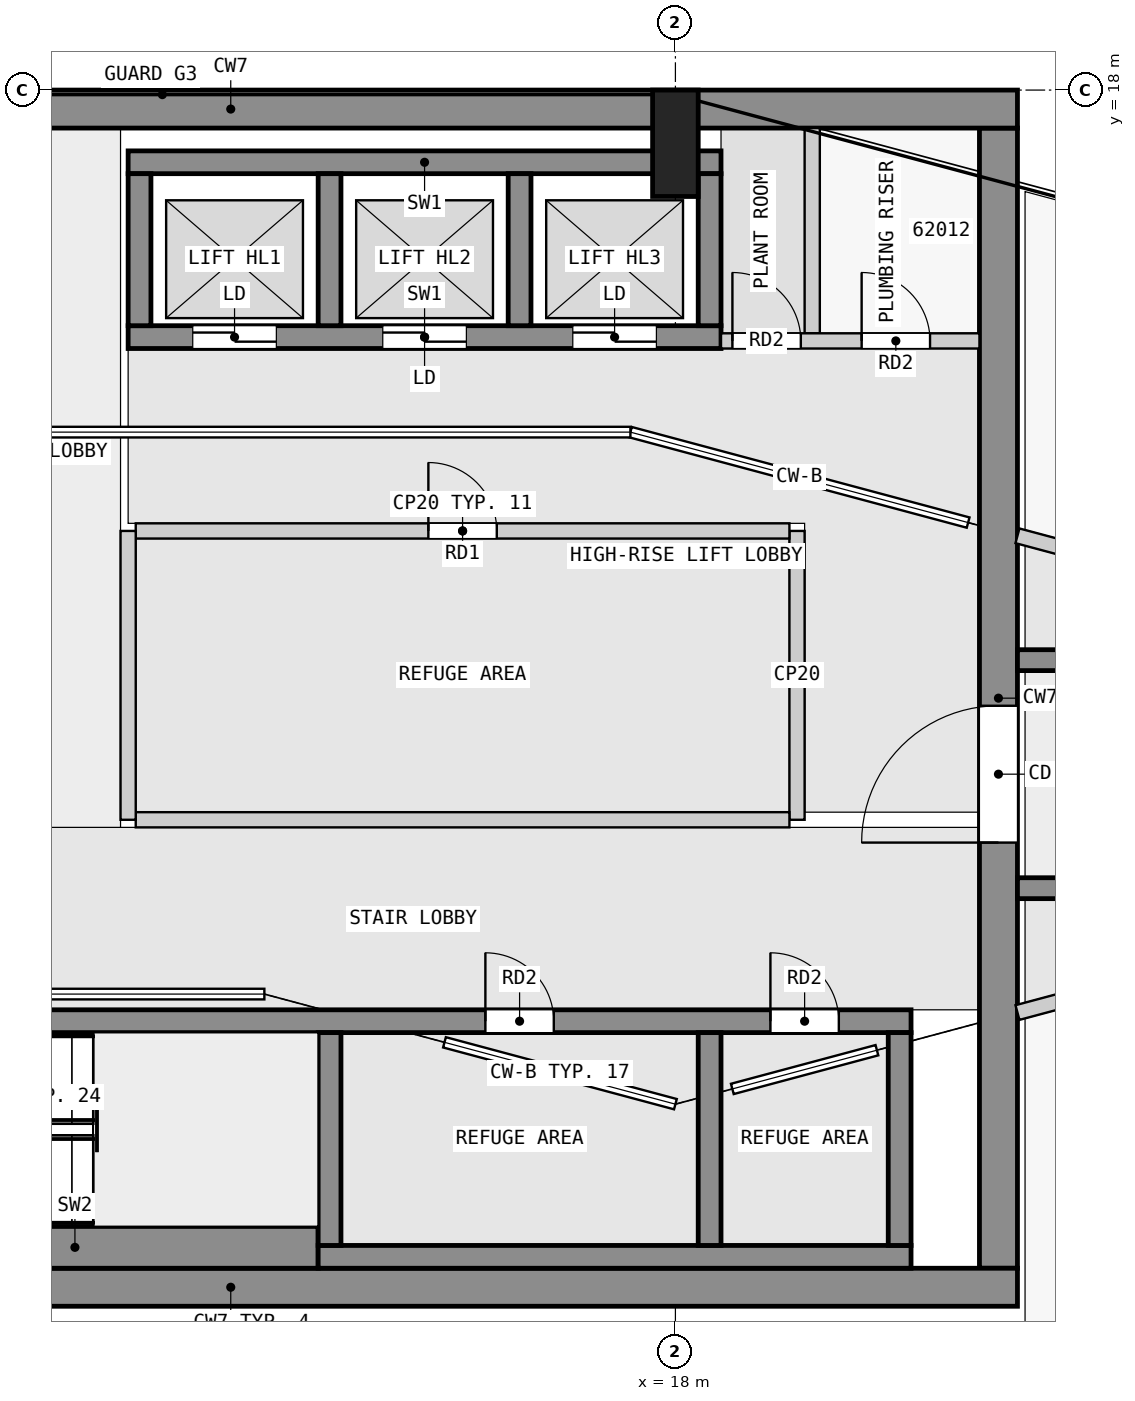
"""IFC4 building model, lengths in metres.
Left out: names, types, materials, properties, quantities, classifications, styles, units other than length and angle.
Written with IfcOpenShell. Run it as: python <this file> out.ifc"""

import sys

from ifc_helpers import new_model, si_unit, direction, frame, frame_2d, origin, origin_2d, place, context, subcontext, project, spatial, rectangle, extrude, element, fill, save


model = new_model("IFC4")
c1 = context("Model", 3, precision=1e-05, world=origin(), true_north=direction((0.0, 1.0)))
c2 = subcontext(c1, "Body", "Model", "MODEL_VIEW")
j1 = project(units=[si_unit("LENGTHUNIT", "METRE"), si_unit("PLANEANGLEUNIT", "RADIAN")], contexts=[c1])
p1 = place(None, origin())
s1 = spatial("IfcSite", under=j1, at=p1, CompositionType="ELEMENT")
p2 = place(p1, origin())
s2 = spatial("IfcBuilding", under=s1, at=p2, CompositionType="ELEMENT")
p3 = place(p2, frame((0.0, 0.0, 236.4)))
s3 = spatial("IfcBuildingStorey", under=s2, at=p3, CompositionType="ELEMENT", Elevation=236.4)
p4 = place(p3, frame((18.0, 17.3, 0.0), z_axis=(0.0, 0.0, 1.0), x_axis=(1.0, 0.0, 0.0)))
e1 = element("IfcColumn", 1, at=p4, inside=s3, PredefinedType="COLUMN", context=c2, shape_type="SweptSolid", body=[
    extrude(rectangle(XDim=0.6, YDim=1.4, at=origin_2d()), origin(), (0.0, 0.0, 1.0), 6.0),
])
for number, where, z_axis, x_axis in (
    (2, (1.8, 2.25, 0.0), (0.0, 0.0, 1.0), (1.0, 0.0, 0.0)),
    (3, (1.8, 17.75, 0.0), (0.0, 0.0, 1.0), (1.0, 0.0, 0.0)),
):
    element("IfcWall", number, at=place(p3, frame(where, z_axis=z_axis, x_axis=x_axis)), inside=s3, PredefinedType="SHEAR", context=c2, shape_type="SweptSolid", body=[
        extrude(rectangle(XDim=20.7, YDim=0.5, at=frame_2d((10.35, 0.0))), origin(), (0.0, 0.0, 1.0), 5.75),
    ])
p5 = place(p3, frame((22.25, 2.5, 0.0), z_axis=(0.0, 0.0, 1.0), x_axis=(0.0, 1.0, 0.0)))
e4 = element("IfcWall", 4, at=p5, inside=s3, PredefinedType="SHEAR", context=c2, shape_type="SweptSolid", body=[
    extrude(rectangle(XDim=15.0, YDim=0.5, at=frame_2d((7.5, 0.0))), origin(), (0.0, 0.0, 1.0), 5.75),
])
p6 = place(p5, frame((5.6, 0.0, 0.0)))
e5 = element("IfcOpeningElement", 5, at=p6, cuts=e4, PredefinedType="OPENING", context=c2, shape_type="SweptSolid", body=[
    extrude(rectangle(XDim=1.8, YDim=2.1, at=frame_2d((0.9, 1.05))), frame((0.0, 0.26, 0.0), z_axis=(0.0, -1.0, 0.0), x_axis=(1.0, 0.0, 0.0)), (0.0, 0.0, 1.0), 0.52),
])
p7 = place(p3, frame((6.9, 2.775, 0.0), z_axis=(0.0, 0.0, 1.0), x_axis=(1.0, 0.0, 0.0)))
e6 = element("IfcWall", 6, at=p7, inside=s3, PredefinedType="SHEAR", context=c2, shape_type="SweptSolid", body=[
    extrude(rectangle(XDim=6.4, YDim=0.55, at=frame_2d((3.2, 0.0))), origin(), (0.0, 0.0, 1.0), 5.75),
])
p8 = place(p3, frame((13.3, 2.65, 0.0), z_axis=(0.0, 0.0, 1.0), x_axis=(1.0, 0.0, 0.0)))
e7 = element("IfcWall", 7, at=p8, inside=s3, PredefinedType="SHEAR", context=c2, shape_type="SweptSolid", body=[
    extrude(rectangle(XDim=7.8, YDim=0.3, at=frame_2d((3.9, 0.0))), origin(), (0.0, 0.0, 1.0), 5.75),
])
for number, where, z_axis, x_axis in (
    (8, (13.45, 2.8, 0.0), (0.0, 0.0, 1.0), (0.0, 1.0, 0.0)),
    (9, (18.45, 2.8, 0.0), (0.0, 0.0, 1.0), (0.0, 1.0, 0.0)),
    (10, (20.95, 2.8, 0.0), (0.0, 0.0, 1.0), (0.0, 1.0, 0.0)),
):
    element("IfcWall", number, at=place(p3, frame(where, z_axis=z_axis, x_axis=x_axis)), inside=s3, PredefinedType="SHEAR", context=c2, shape_type="SweptSolid", body=[
        extrude(rectangle(XDim=2.8, YDim=0.3, at=frame_2d((1.4, 0.0))), origin(), (0.0, 0.0, 1.0), 5.75),
    ])
p9 = place(p3, frame((2.3, 5.75, 0.0), z_axis=(0.0, 0.0, 1.0), x_axis=(1.0, 0.0, 0.0)))
e11 = element("IfcWall", 11, at=p9, inside=s3, PredefinedType="SHEAR", context=c2, shape_type="SweptSolid", body=[
    extrude(rectangle(XDim=18.8, YDim=0.3, at=frame_2d((9.4, 0.0))), origin(), (0.0, 0.0, 1.0), 5.75),
])
p10 = place(p9, frame((4.65, 0.0, 0.0)))
e12 = element("IfcOpeningElement", 12, at=p10, cuts=e11, PredefinedType="OPENING", context=c2, shape_type="SweptSolid", body=[
    extrude(rectangle(XDim=1.1, YDim=2.1, at=frame_2d((0.55, 1.05))), frame((0.0, 0.16, 0.0), z_axis=(0.0, -1.0, 0.0), x_axis=(1.0, 0.0, 0.0)), (0.0, 0.0, 1.0), 0.32),
])
p11 = place(p9, frame((0.45, 0.0, 0.0)))
e13 = element("IfcOpeningElement", 13, at=p11, cuts=e11, PredefinedType="OPENING", context=c2, shape_type="SweptSolid", body=[
    extrude(rectangle(XDim=1.1, YDim=2.1, at=frame_2d((0.55, 1.05))), frame((0.0, 0.16, 0.0), z_axis=(0.0, -1.0, 0.0), x_axis=(1.0, 0.0, 0.0)), (0.0, 0.0, 1.0), 0.32),
])
p12 = place(p9, frame((2.75, 0.0, 0.0)))
e14 = element("IfcOpeningElement", 14, at=p12, cuts=e11, PredefinedType="OPENING", context=c2, shape_type="SweptSolid", body=[
    extrude(rectangle(XDim=1.1, YDim=2.1, at=frame_2d((0.55, 1.05))), frame((0.0, 0.16, 0.0), z_axis=(0.0, -1.0, 0.0), x_axis=(1.0, 0.0, 0.0)), (0.0, 0.0, 1.0), 0.32),
])
p13 = place(p9, frame((13.2, 0.0, 0.0)))
e15 = element("IfcOpeningElement", 15, at=p13, cuts=e11, PredefinedType="OPENING", context=c2, shape_type="SweptSolid", body=[
    extrude(rectangle(XDim=0.9, YDim=2.1, at=frame_2d((0.45, 1.05))), frame((0.0, 0.16, 0.0), z_axis=(0.0, -1.0, 0.0), x_axis=(1.0, 0.0, 0.0)), (0.0, 0.0, 1.0), 0.32),
])
p14 = place(p9, frame((16.95, 0.0, 0.0)))
e16 = element("IfcOpeningElement", 16, at=p14, cuts=e11, PredefinedType="OPENING", context=c2, shape_type="SweptSolid", body=[
    extrude(rectangle(XDim=0.9, YDim=2.1, at=frame_2d((0.45, 1.05))), frame((0.0, 0.16, 0.0), z_axis=(0.0, -1.0, 0.0), x_axis=(1.0, 0.0, 0.0)), (0.0, 0.0, 1.0), 0.32),
])
p15 = place(p3, frame((10.8, 17.05, 0.0), z_axis=(0.0, 0.0, 1.0), x_axis=(1.0, 0.0, 0.0)))
e17 = element("IfcWall", 17, at=p15, inside=s3, PredefinedType="SHEAR", context=c2, shape_type="SweptSolid", body=[
    extrude(rectangle(XDim=7.8, YDim=0.3, at=frame_2d((3.9, 0.0))), origin(), (0.0, 0.0, 1.0), 5.75),
])
p16 = place(p3, frame((10.8, 14.75, 0.0), z_axis=(0.0, 0.0, 1.0), x_axis=(1.0, 0.0, 0.0)))
e18 = element("IfcWall", 18, at=p16, inside=s3, PredefinedType="SHEAR", context=c2, shape_type="SweptSolid", body=[
    extrude(rectangle(XDim=7.8, YDim=0.3, at=frame_2d((3.9, 0.0))), origin(), (0.0, 0.0, 1.0), 5.75),
])
p17 = place(p16, frame((0.85, 0.0, 0.0)))
e19 = element("IfcOpeningElement", 19, at=p17, cuts=e18, PredefinedType="OPENING", context=c2, shape_type="SweptSolid", body=[
    extrude(rectangle(XDim=1.1, YDim=2.1, at=frame_2d((0.55, 1.05))), frame((0.0, 0.16, 0.0), z_axis=(0.0, -1.0, 0.0), x_axis=(1.0, 0.0, 0.0)), (0.0, 0.0, 1.0), 0.32),
])
p18 = place(p16, frame((3.35, 0.0, 0.0)))
e20 = element("IfcOpeningElement", 20, at=p18, cuts=e18, PredefinedType="OPENING", context=c2, shape_type="SweptSolid", body=[
    extrude(rectangle(XDim=1.1, YDim=2.1, at=frame_2d((0.55, 1.05))), frame((0.0, 0.16, 0.0), z_axis=(0.0, -1.0, 0.0), x_axis=(1.0, 0.0, 0.0)), (0.0, 0.0, 1.0), 0.32),
])
p19 = place(p16, frame((5.85, 0.0, 0.0)))
e21 = element("IfcOpeningElement", 21, at=p19, cuts=e18, PredefinedType="OPENING", context=c2, shape_type="SweptSolid", body=[
    extrude(rectangle(XDim=1.1, YDim=2.1, at=frame_2d((0.55, 1.05))), frame((0.0, 0.16, 0.0), z_axis=(0.0, -1.0, 0.0), x_axis=(1.0, 0.0, 0.0)), (0.0, 0.0, 1.0), 0.32),
])
for number, where, z_axis, x_axis in (
    (22, (10.95, 14.9, 0.0), (0.0, 0.0, 1.0), (0.0, 1.0, 0.0)),
    (23, (13.45, 14.9, 0.0), (0.0, 0.0, 1.0), (0.0, 1.0, 0.0)),
    (24, (15.95, 14.9, 0.0), (0.0, 0.0, 1.0), (0.0, 1.0, 0.0)),
    (25, (18.45, 14.9, 0.0), (0.0, 0.0, 1.0), (0.0, 1.0, 0.0)),
):
    element("IfcWall", number, at=place(p3, frame(where, z_axis=z_axis, x_axis=x_axis)), inside=s3, PredefinedType="SHEAR", context=c2, shape_type="SweptSolid", body=[
        extrude(rectangle(XDim=2.0, YDim=0.3, at=frame_2d((1.0, 0.0))), origin(), (0.0, 0.0, 1.0), 5.75),
    ])
p20 = place(p3, frame((22.5, 7.5, 0.0), z_axis=(0.0, 0.0, 1.0), x_axis=(1.0, 0.0, 0.0)))
e26 = element("IfcWall", 26, at=p20, inside=s3, PredefinedType="SHEAR", context=c2, shape_type="SweptSolid", body=[
    extrude(rectangle(XDim=22.5, YDim=0.275, at=frame_2d((11.25, 0.0))), origin(), (0.0, 0.0, 1.0), 5.75),
])
p21 = place(p20, frame((20.1, 0.0, 0.0)))
e27 = element("IfcOpeningElement", 27, at=p21, cuts=e26, PredefinedType="OPENING", context=c2, shape_type="SweptSolid", body=[
    extrude(rectangle(XDim=1.8, YDim=2.1, at=frame_2d((0.9, 1.05))), frame((0.0, 0.147, 0.0), z_axis=(0.0, -1.0, 0.0), x_axis=(1.0, 0.0, 0.0)), (0.0, 0.0, 1.0), 0.295),
])
p22 = place(p20, frame((6.1, 0.0, 0.0)))
e28 = element("IfcOpeningElement", 28, at=p22, cuts=e26, PredefinedType="OPENING", context=c2, shape_type="SweptSolid", body=[
    extrude(rectangle(XDim=1.1, YDim=2.1, at=frame_2d((0.55, 1.05))), frame((0.0, 0.147, 0.0), z_axis=(0.0, -1.0, 0.0), x_axis=(1.0, 0.0, 0.0)), (0.0, 0.0, 1.0), 0.295),
])
p23 = place(p20, frame((16.1, 0.0, 0.0)))
e29 = element("IfcOpeningElement", 29, at=p23, cuts=e26, PredefinedType="OPENING", context=c2, shape_type="SweptSolid", body=[
    extrude(rectangle(XDim=1.0, YDim=2.1, at=frame_2d((0.5, 1.05))), frame((0.0, 0.147, 0.0), z_axis=(0.0, -1.0, 0.0), x_axis=(1.0, 0.0, 0.0)), (0.0, 0.0, 1.0), 0.295),
])
p24 = place(p3, frame((22.5, 10.5, 0.0), z_axis=(0.0, 0.0, 1.0), x_axis=(1.0, 0.0, 0.0)))
e30 = element("IfcWall", 30, at=p24, inside=s3, PredefinedType="SHEAR", context=c2, shape_type="SweptSolid", body=[
    extrude(rectangle(XDim=22.5, YDim=0.275, at=frame_2d((11.25, 0.0))), origin(), (0.0, 0.0, 1.0), 5.75),
])
p25 = place(p24, frame((6.1, 0.0, 0.0)))
e31 = element("IfcOpeningElement", 31, at=p25, cuts=e30, PredefinedType="OPENING", context=c2, shape_type="SweptSolid", body=[
    extrude(rectangle(XDim=1.1, YDim=2.1, at=frame_2d((0.55, 1.05))), frame((0.0, 0.147, 0.0), z_axis=(0.0, -1.0, 0.0), x_axis=(1.0, 0.0, 0.0)), (0.0, 0.0, 1.0), 0.295),
])
p26 = place(p24, frame((14.85, 0.0, 0.0)))
e32 = element("IfcOpeningElement", 32, at=p26, cuts=e30, PredefinedType="OPENING", context=c2, shape_type="SweptSolid", body=[
    extrude(rectangle(XDim=1.6, YDim=2.4, at=frame_2d((0.8, 1.2))), frame((0.0, 0.147, 0.0), z_axis=(0.0, -1.0, 0.0), x_axis=(1.0, 0.0, 0.0)), (0.0, 0.0, 1.0), 0.295),
])
p27 = place(p24, frame((19.35, 0.0, 0.0)))
e33 = element("IfcOpeningElement", 33, at=p27, cuts=e30, PredefinedType="OPENING", context=c2, shape_type="SweptSolid", body=[
    extrude(rectangle(XDim=1.8, YDim=2.1, at=frame_2d((0.9, 1.05))), frame((0.0, 0.147, 0.0), z_axis=(0.0, -1.0, 0.0), x_axis=(1.0, 0.0, 0.0)), (0.0, 0.0, 1.0), 0.295),
])
p28 = place(p3, frame((10.8, 8.4, 0.0), z_axis=(0.0, 0.0, 1.0), x_axis=(0.0, 1.0, 0.0)))
e34 = element("IfcWall", 34, at=p28, inside=s3, PredefinedType="PARTITIONING", context=c2, shape_type="SweptSolid", body=[
    extrude(rectangle(XDim=3.8, YDim=0.2, at=frame_2d((1.9, 0.0))), origin(), (0.0, 0.0, 1.0), 5.75),
])
p29 = place(p3, frame((10.9, 8.4, 0.0), z_axis=(0.0, 0.0, 1.0), x_axis=(1.0, 0.0, 0.0)))
e35 = element("IfcWall", 35, at=p29, inside=s3, PredefinedType="PARTITIONING", context=c2, shape_type="SweptSolid", body=[
    extrude(rectangle(XDim=8.6, YDim=0.2, at=frame_2d((4.3, 0.0))), origin(), (0.0, 0.0, 1.0), 5.75),
])
p30 = place(p3, frame((19.6, 8.4, 0.0), z_axis=(0.0, 0.0, 1.0), x_axis=(0.0, 1.0, 0.0)))
e36 = element("IfcWall", 36, at=p30, inside=s3, PredefinedType="PARTITIONING", context=c2, shape_type="SweptSolid", body=[
    extrude(rectangle(XDim=3.8, YDim=0.2, at=frame_2d((1.9, 0.0))), origin(), (0.0, 0.0, 1.0), 5.75),
])
p31 = place(p3, frame((10.9, 12.2, 0.0), z_axis=(0.0, 0.0, 1.0), x_axis=(1.0, 0.0, 0.0)))
e37 = element("IfcWall", 37, at=p31, inside=s3, PredefinedType="PARTITIONING", context=c2, shape_type="SweptSolid", body=[
    extrude(rectangle(XDim=8.6, YDim=0.2, at=frame_2d((4.3, 0.0))), origin(), (0.0, 0.0, 1.0), 5.75),
])
p32 = place(p31, frame((3.85, 0.0, 0.0)))
e38 = element("IfcOpeningElement", 38, at=p32, cuts=e37, PredefinedType="OPENING", context=c2, shape_type="SweptSolid", body=[
    extrude(rectangle(XDim=0.9, YDim=2.1, at=frame_2d((0.45, 1.05))), frame((0.0, 0.11, 0.0), z_axis=(0.0, -1.0, 0.0), x_axis=(1.0, 0.0, 0.0)), (0.0, 0.0, 1.0), 0.22),
])
p33 = place(p3, frame((18.6, 14.7, 0.0), z_axis=(0.0, 0.0, 1.0), x_axis=(1.0, 0.0, 0.0)))
e39 = element("IfcWall", 39, at=p33, inside=s3, PredefinedType="PARTITIONING", context=c2, shape_type="SweptSolid", body=[
    extrude(rectangle(XDim=3.4, YDim=0.2, at=frame_2d((1.7, 0.0))), origin(), (0.0, 0.0, 1.0), 5.75),
])
p34 = place(p33, frame((0.15, 0.0, 0.0)))
e40 = element("IfcOpeningElement", 40, at=p34, cuts=e39, PredefinedType="OPENING", context=c2, shape_type="SweptSolid", body=[
    extrude(rectangle(XDim=0.9, YDim=2.1, at=frame_2d((0.45, 1.05))), frame((0.0, 0.11, 0.0), z_axis=(0.0, -1.0, 0.0), x_axis=(1.0, 0.0, 0.0)), (0.0, 0.0, 1.0), 0.22),
])
p35 = place(p33, frame((1.85, 0.0, 0.0)))
e41 = element("IfcOpeningElement", 41, at=p35, cuts=e39, PredefinedType="OPENING", context=c2, shape_type="SweptSolid", body=[
    extrude(rectangle(XDim=0.9, YDim=2.1, at=frame_2d((0.45, 1.05))), frame((0.0, 0.11, 0.0), z_axis=(0.0, -1.0, 0.0), x_axis=(1.0, 0.0, 0.0)), (0.0, 0.0, 1.0), 0.22),
])
p36 = place(p3, frame((19.8, 14.8, 0.0), z_axis=(0.0, 0.0, 1.0), x_axis=(0.0, 1.0, 0.0)))
e42 = element("IfcWall", 42, at=p36, inside=s3, PredefinedType="PARTITIONING", context=c2, shape_type="SweptSolid", body=[
    extrude(rectangle(XDim=2.7, YDim=0.2, at=frame_2d((1.35, 0.0))), origin(), (0.0, 0.0, 1.0), 5.75),
])
for number, where, z_axis, x_axis in (
    (43, (23.408, 11.893, 0.0), (0.0, 0.0, 1.0), (-0.966, 0.258, 0.0)),
    (44, (22.5, 5.864, 0.0), (0.0, 0.0, 1.0), (0.966, 0.258, 0.0)),
):
    element("IfcWall", number, at=place(p3, frame(where, z_axis=z_axis, x_axis=x_axis)), inside=s3, PredefinedType="PARTITIONING", context=c2, shape_type="SweptSolid", body=[
        extrude(rectangle(XDim=0.94, YDim=0.2, at=frame_2d((0.47, 0.0))), origin(), (0.0, 0.0, 1.0), 5.75),
    ])
p37 = place(p32, origin())
e45 = element("IfcDoor", 45, at=p37, inside=s3, OperationType="SINGLE_SWING_LEFT", PredefinedType="DOOR", context=c2, shape_type="SweptSolid", body=[
    extrude(rectangle(XDim=0.9, YDim=2.1, at=frame_2d((0.45, 1.05))), frame((0.0, 0.025, 0.0), z_axis=(0.0, -1.0, 0.0), x_axis=(1.0, 0.0, 0.0)), (0.0, 0.0, 1.0), 0.05),
])
fill(e38, e45)
p38 = place(p17, origin())
e46 = element("IfcDoor", 46, at=p38, inside=s3, OperationType="DOUBLE_DOOR_SLIDING", PredefinedType="DOOR", context=c2, shape_type="SweptSolid", body=[
    extrude(rectangle(XDim=1.1, YDim=2.1, at=frame_2d((0.55, 1.05))), frame((0.0, 0.025, 0.0), z_axis=(0.0, -1.0, 0.0), x_axis=(1.0, 0.0, 0.0)), (0.0, 0.0, 1.0), 0.05),
])
fill(e19, e46)
p39 = place(p18, origin())
e47 = element("IfcDoor", 47, at=p39, inside=s3, OperationType="DOUBLE_DOOR_SLIDING", PredefinedType="DOOR", context=c2, shape_type="SweptSolid", body=[
    extrude(rectangle(XDim=1.1, YDim=2.1, at=frame_2d((0.55, 1.05))), frame((0.0, 0.025, 0.0), z_axis=(0.0, -1.0, 0.0), x_axis=(1.0, 0.0, 0.0)), (0.0, 0.0, 1.0), 0.05),
])
fill(e20, e47)
p40 = place(p19, origin())
e48 = element("IfcDoor", 48, at=p40, inside=s3, OperationType="DOUBLE_DOOR_SLIDING", PredefinedType="DOOR", context=c2, shape_type="SweptSolid", body=[
    extrude(rectangle(XDim=1.1, YDim=2.1, at=frame_2d((0.55, 1.05))), frame((0.0, 0.025, 0.0), z_axis=(0.0, -1.0, 0.0), x_axis=(1.0, 0.0, 0.0)), (0.0, 0.0, 1.0), 0.05),
])
fill(e21, e48)
p41 = place(p6, origin())
e49 = element("IfcDoor", 49, at=p41, inside=s3, OperationType="DOUBLE_DOOR_SINGLE_SWING", PredefinedType="DOOR", context=c2, shape_type="SweptSolid", body=[
    extrude(rectangle(XDim=1.8, YDim=2.1, at=frame_2d((0.9, 1.05))), frame((0.0, 0.025, 0.0), z_axis=(0.0, -1.0, 0.0), x_axis=(1.0, 0.0, 0.0)), (0.0, 0.0, 1.0), 0.05),
])
fill(e5, e49)
p42 = place(p34, origin())
e50 = element("IfcDoor", 50, at=p42, inside=s3, OperationType="SINGLE_SWING_LEFT", PredefinedType="DOOR", context=c2, shape_type="SweptSolid", body=[
    extrude(rectangle(XDim=0.9, YDim=2.1, at=frame_2d((0.45, 1.05))), frame((0.0, 0.025, 0.0), z_axis=(0.0, -1.0, 0.0), x_axis=(1.0, 0.0, 0.0)), (0.0, 0.0, 1.0), 0.05),
])
fill(e40, e50)
p43 = place(p35, origin())
e51 = element("IfcDoor", 51, at=p43, inside=s3, OperationType="SINGLE_SWING_LEFT", PredefinedType="DOOR", context=c2, shape_type="SweptSolid", body=[
    extrude(rectangle(XDim=0.9, YDim=2.1, at=frame_2d((0.45, 1.05))), frame((0.0, 0.025, 0.0), z_axis=(0.0, -1.0, 0.0), x_axis=(1.0, 0.0, 0.0)), (0.0, 0.0, 1.0), 0.05),
])
fill(e41, e51)
p44 = place(p13, origin())
e52 = element("IfcDoor", 52, at=p44, inside=s3, OperationType="SINGLE_SWING_LEFT", PredefinedType="DOOR", context=c2, shape_type="SweptSolid", body=[
    extrude(rectangle(XDim=0.9, YDim=2.1, at=frame_2d((0.45, 1.05))), frame((0.0, 0.025, 0.0), z_axis=(0.0, -1.0, 0.0), x_axis=(1.0, 0.0, 0.0)), (0.0, 0.0, 1.0), 0.05),
])
fill(e15, e52)
p45 = place(p14, origin())
e53 = element("IfcDoor", 53, at=p45, inside=s3, OperationType="SINGLE_SWING_LEFT", PredefinedType="DOOR", context=c2, shape_type="SweptSolid", body=[
    extrude(rectangle(XDim=0.9, YDim=2.1, at=frame_2d((0.45, 1.05))), frame((0.0, 0.025, 0.0), z_axis=(0.0, -1.0, 0.0), x_axis=(1.0, 0.0, 0.0)), (0.0, 0.0, 1.0), 0.05),
])
fill(e16, e53)
save(model, sys.argv[1])
